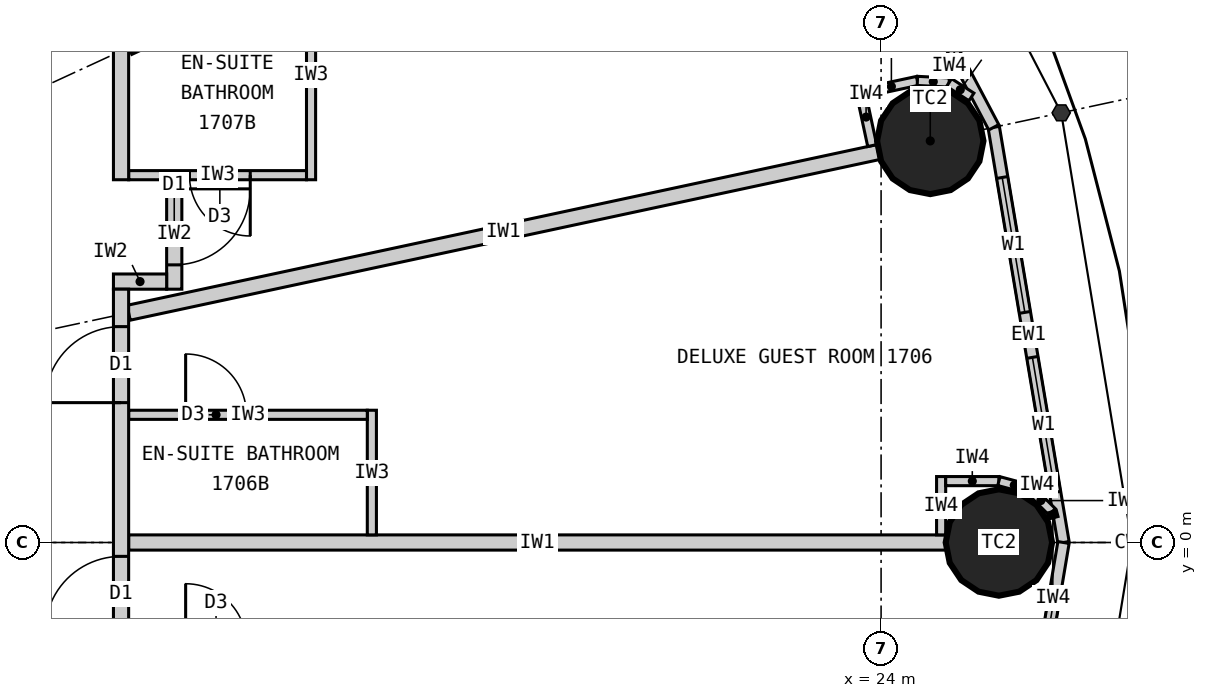
"""IFC4 building model, lengths in metres.
Left out: names, types, materials, properties, quantities, classifications, styles, units other than length and angle.
Written with IfcOpenShell. Run it as: python <this file> out.ifc"""

import sys

from ifc_helpers import new_model, si_unit, direction, frame, frame_2d, origin, origin_2d, place, context, subcontext, project, spatial, rectangle, circle, extrude, element, fill, save


model = new_model("IFC4")
c1 = context("Model", 3, precision=1e-05, world=origin(), true_north=direction((0.0, 1.0)))
c2 = subcontext(c1, "Body", "Model", "MODEL_VIEW")
j1 = project(units=[si_unit("LENGTHUNIT", "METRE"), si_unit("PLANEANGLEUNIT", "RADIAN")], contexts=[c1])
p1 = place(None, origin())
s1 = spatial("IfcSite", under=j1, at=p1, CompositionType="ELEMENT")
p2 = place(p1, origin())
s2 = spatial("IfcBuilding", under=s1, at=p2, CompositionType="ELEMENT")
p3 = place(p2, frame((0.0, 0.0, 70.5)))
s3 = spatial("IfcBuildingStorey", under=s2, at=p3, CompositionType="ELEMENT", Elevation=70.5)
for number, where, z_axis, x_axis in (
    (1, (25.55, 0.0, 0.0), (0.0, 0.0, 1.0), (1.0, 0.0, 0.0)),
    (2, (24.647, 5.283, 0.0), (0.0, 0.0, 1.0), (1.0, 0.0, 0.0)),
):
    element("IfcColumn", number, at=place(p3, frame(where, z_axis=z_axis, x_axis=x_axis)), inside=s3, PredefinedType="COLUMN", context=c2, shape_type="SweptSolid", body=[
        extrude(circle(Radius=0.7, at=origin_2d()), origin(), (0.0, 0.0, 1.0), 3.3),
    ])
p4 = place(p3, frame((26.4, 0.0, 0.0), z_axis=(0.0, 0.0, 1.0), x_axis=(-0.165642551694, 0.986185857264, 0.0)))
e3 = element("IfcWall", 3, at=p4, inside=s3, PredefinedType="ELEMENTEDWALL", context=c2, shape_type="SweptSolid", body=[
    extrude(rectangle(XDim=5.539, YDim=0.15, at=frame_2d((2.77, 0.0))), origin(), (0.0, 0.0, 1.0), 3.12),
])
p5 = place(p4, frame((0.669, 0.0, 0.9)))
e4 = element("IfcOpeningElement", 4, at=p5, cuts=e3, PredefinedType="OPENING", context=c2, shape_type="SweptSolid", body=[
    extrude(rectangle(XDim=1.8, YDim=1.9, at=frame_2d((0.9, 0.95))), frame((0.0, 0.085, 0.0), z_axis=(0.0, -1.0, 0.0), x_axis=(1.0, 0.0, 0.0)), (0.0, 0.0, 1.0), 0.17),
])
p6 = place(p4, frame((3.07, 0.0, 0.9)))
e5 = element("IfcOpeningElement", 5, at=p6, cuts=e3, PredefinedType="OPENING", context=c2, shape_type="SweptSolid", body=[
    extrude(rectangle(XDim=1.8, YDim=1.9, at=frame_2d((0.9, 0.95))), frame((0.0, 0.085, 0.0), z_axis=(0.0, -1.0, 0.0), x_axis=(1.0, 0.0, 0.0)), (0.0, 0.0, 1.0), 0.17),
])
p7 = place(p3, frame((25.482, 5.462, 0.0), z_axis=(0.0, 0.0, 1.0), x_axis=(-0.467296867008, 0.884100468321, 0.0)))
e6 = element("IfcWall", 6, at=p7, inside=s3, PredefinedType="ELEMENTEDWALL", context=c2, shape_type="SweptSolid", body=[
    extrude(rectangle(XDim=5.734, YDim=0.15, at=frame_2d((2.867, 0.0))), origin(), (0.0, 0.0, 1.0), 3.12),
])
p8 = place(p7, frame((0.767, 0.0, 0.9)))
e7 = element("IfcOpeningElement", 7, at=p8, cuts=e6, PredefinedType="OPENING", context=c2, shape_type="SweptSolid", body=[
    extrude(rectangle(XDim=1.8, YDim=1.9, at=frame_2d((0.9, 0.95))), frame((0.0, 0.085, 0.0), z_axis=(0.0, -1.0, 0.0), x_axis=(1.0, 0.0, 0.0)), (0.0, 0.0, 1.0), 0.17),
])
p9 = place(p7, frame((3.167, 0.0, 0.9)))
e8 = element("IfcOpeningElement", 8, at=p9, cuts=e6, PredefinedType="OPENING", context=c2, shape_type="SweptSolid", body=[
    extrude(rectangle(XDim=1.8, YDim=1.9, at=frame_2d((0.9, 0.95))), frame((0.0, 0.085, 0.0), z_axis=(0.0, -1.0, 0.0), x_axis=(1.0, 0.0, 0.0)), (0.0, 0.0, 1.0), 0.17),
])
p10 = place(p3, frame((25.482, -5.462, 0.0), z_axis=(0.0, 0.0, 1.0), x_axis=(0.165642551694, 0.986185857264, 0.0)))
e9 = element("IfcWall", 9, at=p10, inside=s3, PredefinedType="ELEMENTEDWALL", context=c2, shape_type="SweptSolid", body=[
    extrude(rectangle(XDim=5.539, YDim=0.15, at=frame_2d((2.77, 0.0))), origin(), (0.0, 0.0, 1.0), 3.12),
])
p11 = place(p10, frame((0.669, 0.0, 0.9)))
e10 = element("IfcOpeningElement", 10, at=p11, cuts=e9, PredefinedType="OPENING", context=c2, shape_type="SweptSolid", body=[
    extrude(rectangle(XDim=1.8, YDim=1.9, at=frame_2d((0.9, 0.95))), frame((0.0, 0.085, 0.0), z_axis=(0.0, -1.0, 0.0), x_axis=(1.0, 0.0, 0.0)), (0.0, 0.0, 1.0), 0.17),
])
p12 = place(p10, frame((3.07, 0.0, 0.9)))
e11 = element("IfcOpeningElement", 11, at=p12, cuts=e9, PredefinedType="OPENING", context=c2, shape_type="SweptSolid", body=[
    extrude(rectangle(XDim=1.8, YDim=1.9, at=frame_2d((0.9, 0.95))), frame((0.0, 0.085, 0.0), z_axis=(0.0, -1.0, 0.0), x_axis=(1.0, 0.0, 0.0)), (0.0, 0.0, 1.0), 0.17),
])
p13 = place(p3, frame((14.1, 0.0, 0.0), z_axis=(0.0, 0.0, 1.0), x_axis=(1.0, 0.0, 0.0)))
e12 = element("IfcWall", 12, at=p13, inside=s3, PredefinedType="PARTITIONING", context=c2, shape_type="SweptSolid", body=[
    extrude(rectangle(XDim=10.75, YDim=0.2, at=frame_2d((5.375, 0.0))), origin(), (0.0, 0.0, 1.0), 2.27),
])
p14 = place(p3, frame((14.1, 3.022, 0.0), z_axis=(0.0, 0.0, 1.0), x_axis=(0.977790014929, 0.209586943072, 0.0)))
e13 = element("IfcWall", 13, at=p14, inside=s3, PredefinedType="PARTITIONING", context=c2, shape_type="SweptSolid", body=[
    extrude(rectangle(XDim=10.087, YDim=0.2, at=frame_2d((5.043, 0.0))), origin(), (0.0, 0.0, 1.0), 2.32),
])
p15 = place(p3, frame((14.1, 6.512, 0.0), z_axis=(0.0, 0.0, 1.0), x_axis=(0.907832871056, 0.419332181247, 0.0)))
e14 = element("IfcWall", 14, at=p15, inside=s3, PredefinedType="PARTITIONING", context=c2, shape_type="SweptSolid", body=[
    extrude(rectangle(XDim=8.023, YDim=0.2, at=frame_2d((4.011, 0.0))), origin(), (0.0, 0.0, 1.0), 2.32),
])
p16 = place(p3, frame((17.3, 0.1, 0.0), z_axis=(0.0, 0.0, 1.0), x_axis=(0.0, 1.0, 0.0)))
e15 = element("IfcWall", 15, at=p16, inside=s3, PredefinedType="PARTITIONING", context=c2, shape_type="SweptSolid", body=[
    extrude(rectangle(XDim=1.64, YDim=0.12, at=frame_2d((0.82, 0.0))), origin(), (0.0, 0.0, 1.0), 3.12),
])
p17 = place(p3, frame((14.1, 1.68, 0.0), z_axis=(0.0, 0.0, 1.0), x_axis=(1.0, 0.0, 0.0)))
e16 = element("IfcWall", 16, at=p17, inside=s3, PredefinedType="PARTITIONING", context=c2, shape_type="SweptSolid", body=[
    extrude(rectangle(XDim=3.14, YDim=0.12, at=frame_2d((1.57, 0.0))), origin(), (0.0, 0.0, 1.0), 3.12),
])
p18 = place(p17, frame((0.75, 0.0, 0.0)))
e17 = element("IfcOpeningElement", 17, at=p18, cuts=e16, PredefinedType="OPENING", context=c2, shape_type="SweptSolid", body=[
    extrude(rectangle(XDim=0.8, YDim=2.1, at=frame_2d((0.4, 1.05))), frame((0.0, 0.07, 0.0), z_axis=(0.0, -1.0, 0.0), x_axis=(1.0, 0.0, 0.0)), (0.0, 0.0, 1.0), 0.14),
])
p19 = place(p3, frame((16.5, 7.521, 0.0), z_axis=(0.0, 0.0, 1.0), x_axis=(0.0, -1.0, 0.0)))
e18 = element("IfcWall", 18, at=p19, inside=s3, PredefinedType="PARTITIONING", context=c2, shape_type="SweptSolid", body=[
    extrude(rectangle(XDim=2.749, YDim=0.12, at=frame_2d((1.374, 0.0))), origin(), (0.0, 0.0, 1.0), 3.12),
])
p20 = place(p3, frame((14.1, 4.833, 0.0), z_axis=(0.0, 0.0, 1.0), x_axis=(1.0, 0.0, 0.0)))
e19 = element("IfcWall", 19, at=p20, inside=s3, PredefinedType="PARTITIONING", context=c2, shape_type="SweptSolid", body=[
    extrude(rectangle(XDim=2.34, YDim=0.12, at=frame_2d((1.17, 0.0))), origin(), (0.0, 0.0, 1.0), 3.12),
])
p21 = place(p20, frame((0.8, 0.0, 0.0)))
e20 = element("IfcOpeningElement", 20, at=p21, cuts=e19, PredefinedType="OPENING", context=c2, shape_type="SweptSolid", body=[
    extrude(rectangle(XDim=0.8, YDim=2.1, at=frame_2d((0.4, 1.05))), frame((0.0, 0.07, 0.0), z_axis=(0.0, -1.0, 0.0), x_axis=(1.0, 0.0, 0.0)), (0.0, 0.0, 1.0), 0.14),
])
p22 = place(p3, frame((14.7, 3.333, 0.0), z_axis=(0.0, 0.0, 1.0), x_axis=(0.0, 1.0, 0.0)))
e21 = element("IfcWall", 21, at=p22, inside=s3, PredefinedType="PARTITIONING", context=c2, shape_type="SweptSolid", body=[
    extrude(rectangle(XDim=1.44, YDim=0.2, at=frame_2d((0.72, 0.0))), origin(), (0.0, 0.0, 1.0), 3.12),
])
p23 = place(p22, frame((0.32, 0.0, 0.0)))
e22 = element("IfcOpeningElement", 22, at=p23, cuts=e21, PredefinedType="OPENING", context=c2, shape_type="SweptSolid", body=[
    extrude(rectangle(XDim=1.0, YDim=2.2, at=frame_2d((0.5, 1.1))), frame((0.0, 0.11, 0.0), z_axis=(0.0, -1.0, 0.0), x_axis=(1.0, 0.0, 0.0)), (0.0, 0.0, 1.0), 0.22),
])
p24 = place(p3, frame((13.9, 3.433, 0.0), z_axis=(0.0, 0.0, 1.0), x_axis=(1.0, 0.0, 0.0)))
e23 = element("IfcWall", 23, at=p24, inside=s3, PredefinedType="PARTITIONING", context=c2, shape_type="SweptSolid", body=[
    extrude(rectangle(XDim=0.7, YDim=0.2, at=frame_2d((0.35, 0.0))), origin(), (0.0, 0.0, 1.0), 2.32),
])
p25 = place(p3, frame((14.0, -9.9, 0.0), z_axis=(0.0, 0.0, 1.0), x_axis=(0.0, 1.0, 0.0)))
e24 = element("IfcWall", 24, at=p25, inside=s3, PredefinedType="PARTITIONING", context=c2, shape_type="SweptSolid", body=[
    extrude(rectangle(XDim=13.232, YDim=0.2, at=frame_2d((6.616, 0.0))), origin(), (0.0, 0.0, 1.0), 3.12),
])
p26 = place(p25, frame((4.948, 0.0, 0.0)))
e25 = element("IfcOpeningElement", 25, at=p26, cuts=e24, PredefinedType="OPENING", context=c2, shape_type="SweptSolid", body=[
    extrude(rectangle(XDim=1.0, YDim=2.2, at=frame_2d((0.5, 1.1))), frame((0.0, 0.11, 0.0), z_axis=(0.0, -1.0, 0.0), x_axis=(1.0, 0.0, 0.0)), (0.0, 0.0, 1.0), 0.22),
])
p27 = place(p25, frame((8.718, 0.0, 0.0)))
e26 = element("IfcOpeningElement", 26, at=p27, cuts=e24, PredefinedType="OPENING", context=c2, shape_type="SweptSolid", body=[
    extrude(rectangle(XDim=1.0, YDim=2.2, at=frame_2d((0.5, 1.1))), frame((0.0, 0.11, 0.0), z_axis=(0.0, -1.0, 0.0), x_axis=(1.0, 0.0, 0.0)), (0.0, 0.0, 1.0), 0.22),
])
p28 = place(p25, frame((11.74, 0.0, 0.0)))
e27 = element("IfcOpeningElement", 27, at=p28, cuts=e24, PredefinedType="OPENING", context=c2, shape_type="SweptSolid", body=[
    extrude(rectangle(XDim=1.0, YDim=2.2, at=frame_2d((0.5, 1.1))), frame((0.0, 0.11, 0.0), z_axis=(0.0, -1.0, 0.0), x_axis=(1.0, 0.0, 0.0)), (0.0, 0.0, 1.0), 0.22),
])
p29 = place(p3, frame((14.0, 4.772, 0.0), z_axis=(0.0, 0.0, 1.0), x_axis=(0.0, 1.0, 0.0)))
e28 = element("IfcWall", 28, at=p29, inside=s3, PredefinedType="PARTITIONING", context=c2, shape_type="SweptSolid", body=[
    extrude(rectangle(XDim=5.127, YDim=0.2, at=frame_2d((2.564, 0.0))), origin(), (0.0, 0.0, 1.0), 3.12),
])
p30 = place(p29, frame((4.025, 0.0, 0.0)))
e29 = element("IfcOpeningElement", 29, at=p30, cuts=e28, PredefinedType="OPENING", context=c2, shape_type="SweptSolid", body=[
    extrude(rectangle(XDim=1.0, YDim=2.2, at=frame_2d((0.5, 1.1))), frame((0.0, 0.11, 0.0), z_axis=(0.0, -1.0, 0.0), x_axis=(1.0, 0.0, 0.0)), (0.0, 0.0, 1.0), 0.22),
])
p31 = place(p3, frame((24.79, 0.1, 0.0), z_axis=(0.0, 0.0, 1.0), x_axis=(0.0, 1.0, 0.0)))
e30 = element("IfcWall", 30, at=p31, inside=s3, PredefinedType="PARTITIONING", context=c2, shape_type="SweptSolid", body=[
    extrude(rectangle(XDim=0.767, YDim=0.12, at=frame_2d((0.384, 0.0))), origin(), (0.0, 0.0, 1.0), 3.12),
])
p32 = place(p3, frame((24.85, 0.808, 0.0), z_axis=(0.0, 0.0, 1.0), x_axis=(1.0, 0.0, 0.0)))
e31 = element("IfcWall", 31, at=p32, inside=s3, PredefinedType="PARTITIONING", context=c2, shape_type="SweptSolid", body=[
    extrude(rectangle(XDim=0.7, YDim=0.12, at=frame_2d((0.35, 0.0))), origin(), (0.0, 0.0, 1.0), 3.12),
])
p33 = place(p3, frame((25.55, 0.808, 0.0), z_axis=(0.0, 0.0, 1.0), x_axis=(0.965807183573, -0.2592614205, 0.0)))
e32 = element("IfcWall", 32, at=p33, inside=s3, PredefinedType="PARTITIONING", context=c2, shape_type="SweptSolid", body=[
    extrude(rectangle(XDim=0.418, YDim=0.12, at=frame_2d((0.209, 0.0))), origin(), (0.0, 0.0, 1.0), 3.12),
])
p34 = place(p3, frame((25.954, 0.699, 0.0), z_axis=(0.0, 0.0, 1.0), x_axis=(0.707106781187, -0.707106781187, 0.0)))
e33 = element("IfcWall", 33, at=p34, inside=s3, PredefinedType="PARTITIONING", context=c2, shape_type="SweptSolid", body=[
    extrude(rectangle(XDim=0.418, YDim=0.12, at=frame_2d((0.209, 0.0))), origin(), (0.0, 0.0, 1.0), 3.12),
])
p35 = place(p3, frame((26.249, 0.404, 0.0), z_axis=(0.0, 0.0, 1.0), x_axis=(0.259754282609, -0.965674744759, 0.0)))
e34 = element("IfcWall", 34, at=p35, inside=s3, PredefinedType="PARTITIONING", context=c2, shape_type="SweptSolid", body=[
    extrude(rectangle(XDim=0.08, YDim=0.12, at=frame_2d((0.04, 0.0))), origin(), (0.0, 0.0, 1.0), 3.12),
])
p36 = place(p3, frame((23.883, 5.222, 0.0), z_axis=(0.0, 0.0, 1.0), x_axis=(-0.209311842415, 0.977848941619, 0.0)))
e35 = element("IfcWall", 35, at=p36, inside=s3, PredefinedType="PARTITIONING", context=c2, shape_type="SweptSolid", body=[
    extrude(rectangle(XDim=0.768, YDim=0.12, at=frame_2d((0.384, 0.0))), origin(), (0.0, 0.0, 1.0), 3.12),
])
p37 = place(p3, frame((23.793, 5.926, 0.0), z_axis=(0.0, 0.0, 1.0), x_axis=(0.977792206673, 0.209576717621, 0.0)))
e36 = element("IfcWall", 36, at=p37, inside=s3, PredefinedType="PARTITIONING", context=c2, shape_type="SweptSolid", body=[
    extrude(rectangle(XDim=0.7, YDim=0.12, at=frame_2d((0.35, 0.0))), origin(), (0.0, 0.0, 1.0), 3.12),
])
p38 = place(p3, frame((24.478, 6.073, 0.0), z_axis=(0.0, 0.0, 1.0), x_axis=(0.998708262812, -0.05081147302, 0.0)))
e37 = element("IfcWall", 37, at=p38, inside=s3, PredefinedType="PARTITIONING", context=c2, shape_type="SweptSolid", body=[
    extrude(rectangle(XDim=0.418, YDim=0.12, at=frame_2d((0.209, 0.0))), origin(), (0.0, 0.0, 1.0), 3.12),
])
p39 = place(p3, frame((24.895, 6.052, 0.0), z_axis=(0.0, 0.0, 1.0), x_axis=(0.839495197275, -0.54336710772, 0.0)))
e38 = element("IfcWall", 38, at=p39, inside=s3, PredefinedType="PARTITIONING", context=c2, shape_type="SweptSolid", body=[
    extrude(rectangle(XDim=0.35, YDim=0.12, at=frame_2d((0.175, 0.0))), origin(), (0.0, 0.0, 1.0), 3.12),
])
p40 = place(p5, origin())
e39 = element("IfcWindow", 39, at=p40, inside=s3, PartitioningType="SINGLE_PANEL", PredefinedType="WINDOW", context=c2, shape_type="SweptSolid", body=[
    extrude(rectangle(XDim=1.8, YDim=1.9, at=frame_2d((0.9, 0.95))), frame((0.0, 0.03, 0.0), z_axis=(0.0, -1.0, 0.0), x_axis=(1.0, 0.0, 0.0)), (0.0, 0.0, 1.0), 0.06),
])
fill(e4, e39)
p41 = place(p6, origin())
e40 = element("IfcWindow", 40, at=p41, inside=s3, PartitioningType="SINGLE_PANEL", PredefinedType="WINDOW", context=c2, shape_type="SweptSolid", body=[
    extrude(rectangle(XDim=1.8, YDim=1.9, at=frame_2d((0.9, 0.95))), frame((0.0, 0.03, 0.0), z_axis=(0.0, -1.0, 0.0), x_axis=(1.0, 0.0, 0.0)), (0.0, 0.0, 1.0), 0.06),
])
fill(e5, e40)
p42 = place(p8, origin())
e41 = element("IfcWindow", 41, at=p42, inside=s3, PartitioningType="SINGLE_PANEL", PredefinedType="WINDOW", context=c2, shape_type="SweptSolid", body=[
    extrude(rectangle(XDim=1.8, YDim=1.9, at=frame_2d((0.9, 0.95))), frame((0.0, 0.03, 0.0), z_axis=(0.0, -1.0, 0.0), x_axis=(1.0, 0.0, 0.0)), (0.0, 0.0, 1.0), 0.06),
])
fill(e7, e41)
p43 = place(p12, origin())
e42 = element("IfcWindow", 42, at=p43, inside=s3, PartitioningType="SINGLE_PANEL", PredefinedType="WINDOW", context=c2, shape_type="SweptSolid", body=[
    extrude(rectangle(XDim=1.8, YDim=1.9, at=frame_2d((0.9, 0.95))), frame((0.0, 0.03, 0.0), z_axis=(0.0, -1.0, 0.0), x_axis=(1.0, 0.0, 0.0)), (0.0, 0.0, 1.0), 0.06),
])
fill(e11, e42)
p44 = place(p27, origin())
e43 = element("IfcDoor", 43, at=p44, inside=s3, OperationType="SINGLE_SWING_LEFT", PredefinedType="DOOR", context=c2, shape_type="SweptSolid", body=[
    extrude(rectangle(XDim=1.0, YDim=2.2, at=frame_2d((0.5, 1.1))), frame((0.0, 0.025, 0.0), z_axis=(0.0, -1.0, 0.0), x_axis=(1.0, 0.0, 0.0)), (0.0, 0.0, 1.0), 0.05),
])
fill(e26, e43)
p45 = place(p18, origin())
e44 = element("IfcDoor", 44, at=p45, inside=s3, OperationType="SINGLE_SWING_LEFT", PredefinedType="DOOR", context=c2, shape_type="SweptSolid", body=[
    extrude(rectangle(XDim=0.8, YDim=2.1, at=frame_2d((0.4, 1.05))), frame((0.0, 0.025, 0.0), z_axis=(0.0, -1.0, 0.0), x_axis=(1.0, 0.0, 0.0)), (0.0, 0.0, 1.0), 0.05),
])
fill(e17, e44)
p46 = place(p28, origin())
e45 = element("IfcDoor", 45, at=p46, inside=s3, OperationType="SINGLE_SWING_LEFT", PredefinedType="DOOR", context=c2, shape_type="SweptSolid", body=[
    extrude(rectangle(XDim=1.0, YDim=2.2, at=frame_2d((0.5, 1.1))), frame((0.0, 0.025, 0.0), z_axis=(0.0, -1.0, 0.0), x_axis=(1.0, 0.0, 0.0)), (0.0, 0.0, 1.0), 0.05),
])
fill(e27, e45)
p47 = place(p21, origin())
e46 = element("IfcDoor", 46, at=p47, inside=s3, OperationType="SINGLE_SWING_RIGHT", PredefinedType="DOOR", context=c2, shape_type="SweptSolid", body=[
    extrude(rectangle(XDim=0.8, YDim=2.1, at=frame_2d((0.4, 1.05))), frame((0.0, 0.025, 0.0), z_axis=(0.0, -1.0, 0.0), x_axis=(1.0, 0.0, 0.0)), (0.0, 0.0, 1.0), 0.05),
])
fill(e20, e46)
p48 = place(p23, origin())
e47 = element("IfcDoor", 47, at=p48, inside=s3, OperationType="SINGLE_SWING_RIGHT", PredefinedType="DOOR", context=c2, shape_type="SweptSolid", body=[
    extrude(rectangle(XDim=1.0, YDim=2.2, at=frame_2d((0.5, 1.1))), frame((0.0, 0.025, 0.0), z_axis=(0.0, -1.0, 0.0), x_axis=(1.0, 0.0, 0.0)), (0.0, 0.0, 1.0), 0.05),
])
fill(e22, e47)
save(model, sys.argv[1])
